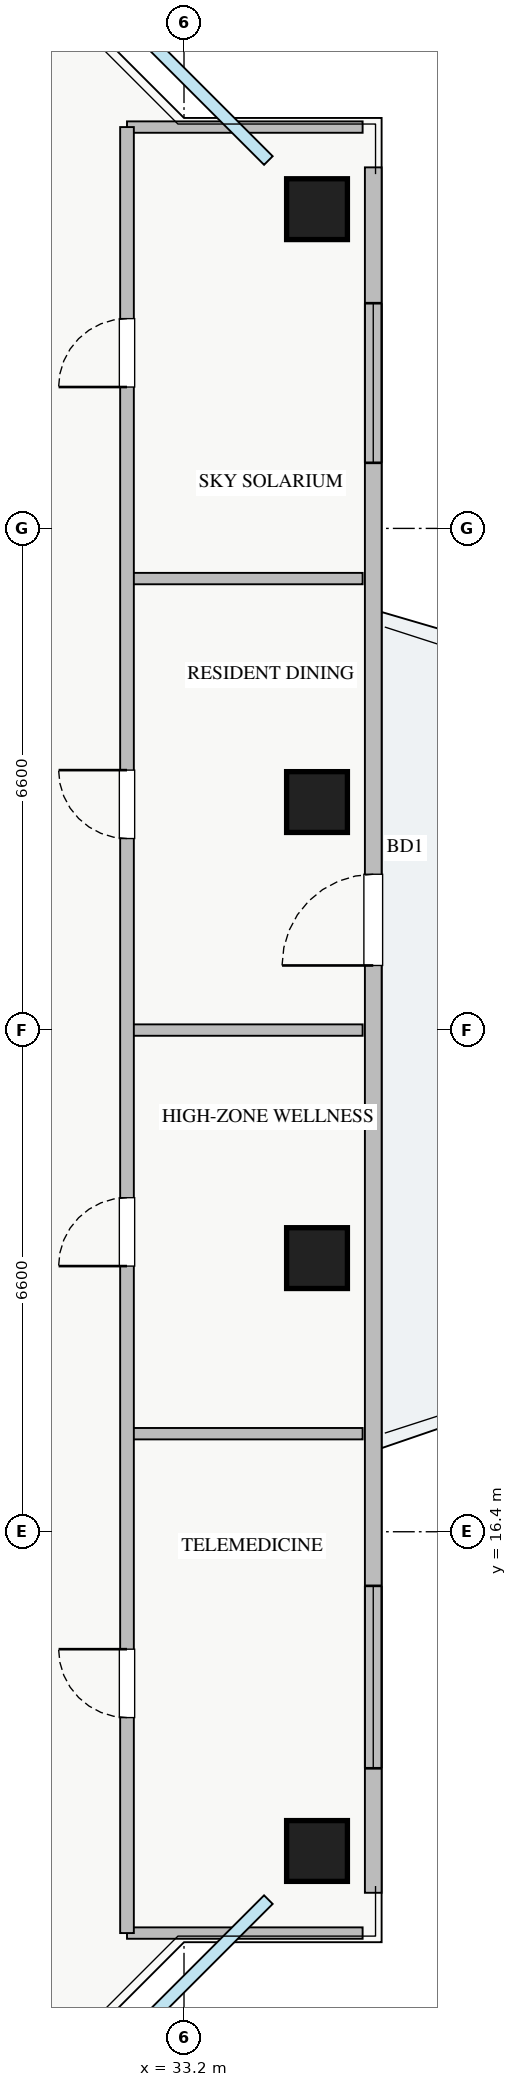
"""IFC4 building model, lengths in metres.
Left out: names, types, materials, properties, quantities, classifications, styles, units other than length and angle.
Written with IfcOpenShell. Run it as: python <this file> out.ifc"""

import sys

from ifc_helpers import new_model, si_unit, direction, frame, frame_2d, origin, origin_2d, place, context, subcontext, project, spatial, rectangle, extrude, source, transform, mapped, element, fill, save


model = new_model("IFC4")
c1 = context("Model", 3, precision=1e-05, world=origin(), true_north=direction((0.0, 1.0)))
c2 = subcontext(c1, "Body", "Model", "MODEL_VIEW")
j1 = project(units=[si_unit("LENGTHUNIT", "METRE"), si_unit("PLANEANGLEUNIT", "RADIAN")], contexts=[c1])
p1 = place(None, origin())
s1 = spatial("IfcSite", under=j1, at=p1, CompositionType="ELEMENT")
p2 = place(p1, origin())
s2 = spatial("IfcBuilding", under=s1, at=p2, CompositionType="ELEMENT")
p3 = place(p2, frame((0.0, 0.0, 216.5)))
s3 = spatial("IfcBuildingStorey", under=s2, at=p3, CompositionType="ELEMENT", Elevation=216.5)
m1 = source(origin(), c2, "Body", "SweptSolid", [
    extrude(rectangle(XDim=0.8, YDim=0.8, at=origin_2d()), origin(), (0.0, 0.0, 1.0), 3.25),
])
for number, where, z_axis, x_axis in (
    (1, (34.95, 12.2, 0.0), (0.0, 0.0, 1.0), (1.0, 0.0, 0.0)),
    (2, (34.95, 20.0, 0.0), (0.0, 0.0, 1.0), (1.0, 0.0, 0.0)),
    (3, (34.95, 26.0, 0.0), (0.0, 0.0, 1.0), (1.0, 0.0, 0.0)),
    (4, (34.95, 33.8, 0.0), (0.0, 0.0, 1.0), (1.0, 0.0, 0.0)),
):
    element("IfcColumn", number, at=place(p3, frame(where, z_axis=z_axis, x_axis=x_axis)), inside=s3, PredefinedType="COLUMN", context=c2, shape_type="MappedRepresentation", body=[
        mapped(m1, transform((0.0, 0.0, 0.0), x_axis=(1.0, 0.0, 0.0), y_axis=(0.0, 1.0, 0.0), z_axis=(0.0, 0.0, 1.0), scale=1.0)),
    ])
p4 = place(p3, frame((35.69, 11.65, 0.0), z_axis=(0.0, 0.0, 1.0), x_axis=(0.0, 1.0, 0.0)))
e5 = element("IfcWall", 5, at=p4, inside=s3, PredefinedType="STANDARD", context=c2, shape_type="SweptSolid", body=[
    extrude(rectangle(XDim=22.7, YDim=0.22, at=frame_2d((11.35, 0.0))), origin(), (0.0, 0.0, 1.0), 2.61),
])
p5 = place(p4, frame((12.2, 0.0, 0.0)))
e6 = element("IfcOpeningElement", 6, at=p5, cuts=e5, PredefinedType="OPENING", context=c2, shape_type="SweptSolid", body=[
    extrude(rectangle(XDim=1.2, YDim=2.1, at=frame_2d((0.6, 1.05))), frame((0.0, 0.12, 0.0), z_axis=(0.0, -1.0, 0.0), x_axis=(1.0, 0.0, 0.0)), (0.0, 0.0, 1.0), 0.24),
])
p6 = place(p4, frame((1.638, 0.0, 0.9)))
e7 = element("IfcOpeningElement", 7, at=p6, cuts=e5, PredefinedType="OPENING", context=c2, shape_type="SweptSolid", body=[
    extrude(rectangle(XDim=2.4, YDim=1.48, at=frame_2d((1.2, 0.74))), frame((0.0, 0.12, 0.0), z_axis=(0.0, -1.0, 0.0), x_axis=(1.0, 0.0, 0.0)), (0.0, 0.0, 1.0), 0.24),
])
p7 = place(p4, frame((18.813, 0.0, 0.9)))
e8 = element("IfcOpeningElement", 8, at=p7, cuts=e5, PredefinedType="OPENING", context=c2, shape_type="SweptSolid", body=[
    extrude(rectangle(XDim=2.1, YDim=1.48, at=frame_2d((1.05, 0.74))), frame((0.0, 0.12, 0.0), z_axis=(0.0, -1.0, 0.0), x_axis=(1.0, 0.0, 0.0)), (0.0, 0.0, 1.0), 0.24),
])
for number, where, z_axis, x_axis in (
    (9, (32.45, 34.88, 0.0), (0.0, 0.0, 1.0), (1.0, 0.0, 0.0)),
    (10, (32.45, 11.12, 0.0), (0.0, 0.0, 1.0), (1.0, 0.0, 0.0)),
    (11, (32.45, 17.69, 0.0), (0.0, 0.0, 1.0), (1.0, 0.0, 0.0)),
    (12, (32.45, 23.0, 0.0), (0.0, 0.0, 1.0), (1.0, 0.0, 0.0)),
    (13, (32.45, 28.94, 0.0), (0.0, 0.0, 1.0), (1.0, 0.0, 0.0)),
):
    element("IfcWall", number, at=place(p3, frame(where, z_axis=z_axis, x_axis=x_axis)), inside=s3, PredefinedType="PARTITIONING", context=c2, shape_type="SweptSolid", body=[
        extrude(rectangle(XDim=3.1, YDim=0.15, at=frame_2d((1.55, 0.0))), origin(), (0.0, 0.0, 1.0), 3.07),
    ])
p8 = place(p3, frame((32.45, 11.12, 0.0), z_axis=(0.0, 0.0, 1.0), x_axis=(0.0, 1.0, 0.0)))
e14 = element("IfcWall", 14, at=p8, inside=s3, PredefinedType="PARTITIONING", context=c2, shape_type="SweptSolid", body=[
    extrude(rectangle(XDim=23.76, YDim=0.18, at=frame_2d((11.88, 0.0))), origin(), (0.0, 0.0, 1.0), 3.07),
])
p9 = place(p8, frame((2.835, 0.0, 0.0)))
e15 = element("IfcOpeningElement", 15, at=p9, cuts=e14, PredefinedType="OPENING", context=c2, shape_type="SweptSolid", body=[
    extrude(rectangle(XDim=0.9, YDim=2.05, at=frame_2d((0.45, 1.025))), frame((0.0, 0.1, 0.0), z_axis=(0.0, -1.0, 0.0), x_axis=(1.0, 0.0, 0.0)), (0.0, 0.0, 1.0), 0.2),
])
p10 = place(p8, frame((8.775, 0.0, 0.0)))
e16 = element("IfcOpeningElement", 16, at=p10, cuts=e14, PredefinedType="OPENING", context=c2, shape_type="SweptSolid", body=[
    extrude(rectangle(XDim=0.9, YDim=2.05, at=frame_2d((0.45, 1.025))), frame((0.0, 0.1, 0.0), z_axis=(0.0, -1.0, 0.0), x_axis=(1.0, 0.0, 0.0)), (0.0, 0.0, 1.0), 0.2),
])
p11 = place(p8, frame((14.4, 0.0, 0.0)))
e17 = element("IfcOpeningElement", 17, at=p11, cuts=e14, PredefinedType="OPENING", context=c2, shape_type="SweptSolid", body=[
    extrude(rectangle(XDim=0.9, YDim=2.05, at=frame_2d((0.45, 1.025))), frame((0.0, 0.1, 0.0), z_axis=(0.0, -1.0, 0.0), x_axis=(1.0, 0.0, 0.0)), (0.0, 0.0, 1.0), 0.2),
])
p12 = place(p8, frame((20.34, 0.0, 0.0)))
e18 = element("IfcOpeningElement", 18, at=p12, cuts=e14, PredefinedType="OPENING", context=c2, shape_type="SweptSolid", body=[
    extrude(rectangle(XDim=0.9, YDim=2.05, at=frame_2d((0.45, 1.025))), frame((0.0, 0.1, 0.0), z_axis=(0.0, -1.0, 0.0), x_axis=(1.0, 0.0, 0.0)), (0.0, 0.0, 1.0), 0.2),
])
m2 = source(origin(), c2, "Body", "SweptSolid", [
    extrude(rectangle(XDim=1.2, YDim=2.1, at=frame_2d((0.6, 1.05))), frame((0.0, 0.025, 0.0), z_axis=(0.0, -1.0, 0.0), x_axis=(1.0, 0.0, 0.0)), (0.0, 0.0, 1.0), 0.05),
])
p13 = place(p5, origin())
e19 = element("IfcDoor", 19, at=p13, inside=s3, OperationType="SINGLE_SWING_LEFT", PredefinedType="DOOR", context=c2, shape_type="MappedRepresentation", body=[
    mapped(m2, transform((0.0, 0.0, 0.0), x_axis=(1.0, 0.0, 0.0), y_axis=(0.0, 1.0, 0.0), z_axis=(0.0, 0.0, 1.0), scale=1.0)),
])
fill(e6, e19)
m3 = source(origin(), c2, "Body", "SweptSolid", [
    extrude(rectangle(XDim=2.4, YDim=1.48, at=frame_2d((1.2, 0.74))), frame((0.0, 0.03, 0.0), z_axis=(0.0, -1.0, 0.0), x_axis=(1.0, 0.0, 0.0)), (0.0, 0.0, 1.0), 0.06),
])
p14 = place(p6, origin())
e20 = element("IfcWindow", 20, at=p14, inside=s3, PartitioningType="TRIPLE_PANEL_VERTICAL", PredefinedType="WINDOW", context=c2, shape_type="MappedRepresentation", body=[
    mapped(m3, transform((0.0, 0.0, 0.0), x_axis=(1.0, 0.0, 0.0), y_axis=(0.0, 1.0, 0.0), z_axis=(0.0, 0.0, 1.0), scale=1.0)),
])
fill(e7, e20)
m4 = source(origin(), c2, "Body", "SweptSolid", [
    extrude(rectangle(XDim=2.1, YDim=1.48, at=frame_2d((1.05, 0.74))), frame((0.0, 0.03, 0.0), z_axis=(0.0, -1.0, 0.0), x_axis=(1.0, 0.0, 0.0)), (0.0, 0.0, 1.0), 0.06),
])
p15 = place(p7, origin())
e21 = element("IfcWindow", 21, at=p15, inside=s3, PartitioningType="TRIPLE_PANEL_VERTICAL", PredefinedType="WINDOW", context=c2, shape_type="MappedRepresentation", body=[
    mapped(m4, transform((0.0, 0.0, 0.0), x_axis=(1.0, 0.0, 0.0), y_axis=(0.0, 1.0, 0.0), z_axis=(0.0, 0.0, 1.0), scale=1.0)),
])
fill(e8, e21)
m5 = source(origin(), c2, "Body", "SweptSolid", [
    extrude(rectangle(XDim=0.9, YDim=2.05, at=frame_2d((0.45, 1.025))), frame((0.0, 0.025, 0.0), z_axis=(0.0, -1.0, 0.0), x_axis=(1.0, 0.0, 0.0)), (0.0, 0.0, 1.0), 0.05),
])
p16 = place(p9, origin())
e22 = element("IfcDoor", 22, at=p16, inside=s3, OperationType="SINGLE_SWING_RIGHT", PredefinedType="DOOR", context=c2, shape_type="MappedRepresentation", body=[
    mapped(m5, transform((0.0, 0.0, 0.0), x_axis=(1.0, 0.0, 0.0), y_axis=(0.0, 1.0, 0.0), z_axis=(0.0, 0.0, 1.0), scale=1.0)),
])
fill(e15, e22)
p17 = place(p10, origin())
e23 = element("IfcDoor", 23, at=p17, inside=s3, OperationType="SINGLE_SWING_LEFT", PredefinedType="DOOR", context=c2, shape_type="MappedRepresentation", body=[
    mapped(m5, transform((0.0, 0.0, 0.0), x_axis=(1.0, 0.0, 0.0), y_axis=(0.0, 1.0, 0.0), z_axis=(0.0, 0.0, 1.0), scale=1.0)),
])
fill(e16, e23)
p18 = place(p11, origin())
e24 = element("IfcDoor", 24, at=p18, inside=s3, OperationType="SINGLE_SWING_RIGHT", PredefinedType="DOOR", context=c2, shape_type="MappedRepresentation", body=[
    mapped(m5, transform((0.0, 0.0, 0.0), x_axis=(1.0, 0.0, 0.0), y_axis=(0.0, 1.0, 0.0), z_axis=(0.0, 0.0, 1.0), scale=1.0)),
])
fill(e17, e24)
p19 = place(p12, origin())
e25 = element("IfcDoor", 25, at=p19, inside=s3, OperationType="SINGLE_SWING_LEFT", PredefinedType="DOOR", context=c2, shape_type="MappedRepresentation", body=[
    mapped(m5, transform((0.0, 0.0, 0.0), x_axis=(1.0, 0.0, 0.0), y_axis=(0.0, 1.0, 0.0), z_axis=(0.0, 0.0, 1.0), scale=1.0)),
])
fill(e18, e25)
save(model, sys.argv[1])
